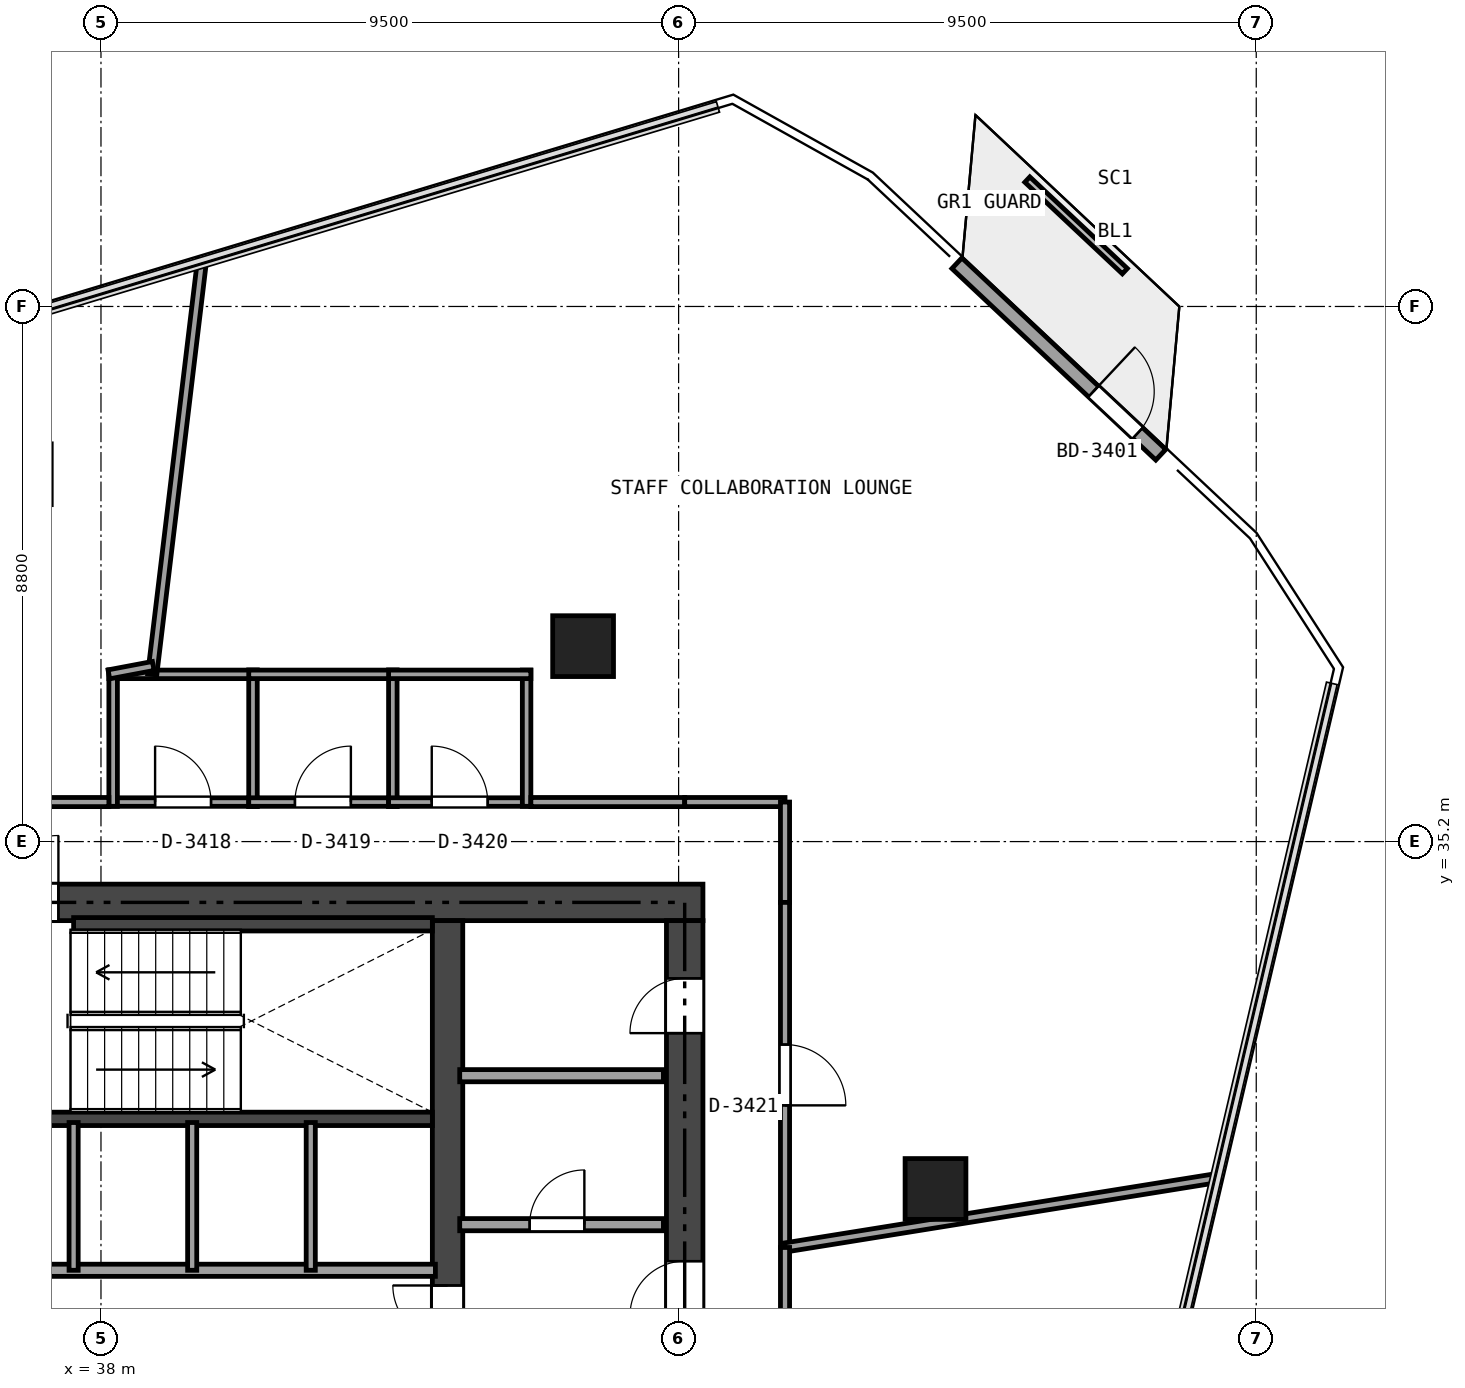
"""IFC4 building model, lengths in metres.
Left out: names, types, materials, properties, quantities, classifications, styles, units other than length and angle.
Written with IfcOpenShell. Run it as: python <this file> out.ifc"""

import sys

from ifc_helpers import new_model, si_unit, direction, frame, frame_2d, origin, origin_2d, place, context, subcontext, project, spatial, rectangle, extrude, element, fill, save


model = new_model("IFC4")
c1 = context("Model", 3, precision=1e-05, world=origin(), true_north=direction((0.0, 1.0)))
c2 = subcontext(c1, "Body", "Model", "MODEL_VIEW")
j1 = project(units=[si_unit("LENGTHUNIT", "METRE"), si_unit("PLANEANGLEUNIT", "RADIAN")], contexts=[c1])
p1 = place(None, origin())
s1 = spatial("IfcSite", under=j1, at=p1, CompositionType="ELEMENT")
p2 = place(p1, origin())
s2 = spatial("IfcBuilding", under=s1, at=p2, CompositionType="ELEMENT")
p3 = place(p2, frame((0.0, 0.0, 129.3)))
s3 = spatial("IfcBuildingStorey", under=s2, at=p3, CompositionType="ELEMENT", Elevation=129.3)
p4 = place(p3, frame((26.5, 34.2, 0.0), z_axis=(0.0, 0.0, 1.0), x_axis=(1.0, 0.0, 0.0)))
e1 = element("IfcWall", 1, at=p4, inside=s3, PredefinedType="SHEAR", context=c2, shape_type="SweptSolid", body=[
    extrude(rectangle(XDim=21.4, YDim=0.6, at=frame_2d((10.7, 0.0))), origin(), (0.0, 0.0, 1.0), 3.32),
])
p5 = place(p4, frame((9.7, 0.0, 0.0)))
e2 = element("IfcOpeningElement", 2, at=p5, cuts=e1, PredefinedType="OPENING", context=c2, shape_type="SweptSolid", body=[
    extrude(rectangle(XDim=1.1, YDim=2.15, at=frame_2d((0.55, 1.075))), frame((0.0, 0.31, 0.0), z_axis=(0.0, -1.0, 0.0), x_axis=(1.0, 0.0, 0.0)), (0.0, 0.0, 1.0), 0.62),
])
p6 = place(p4, frame((1.95, 0.0, 0.0)))
e3 = element("IfcOpeningElement", 3, at=p6, cuts=e1, PredefinedType="OPENING", context=c2, shape_type="SweptSolid", body=[
    extrude(rectangle(XDim=0.9, YDim=2.1, at=frame_2d((0.45, 1.05))), frame((0.0, 0.31, 0.0), z_axis=(0.0, -1.0, 0.0), x_axis=(1.0, 0.0, 0.0)), (0.0, 0.0, 1.0), 0.62),
])
p7 = place(p4, frame((6.25, 0.0, 0.0)))
e4 = element("IfcOpeningElement", 4, at=p7, cuts=e1, PredefinedType="OPENING", context=c2, shape_type="SweptSolid", body=[
    extrude(rectangle(XDim=0.9, YDim=2.1, at=frame_2d((0.45, 1.05))), frame((0.0, 0.31, 0.0), z_axis=(0.0, -1.0, 0.0), x_axis=(1.0, 0.0, 0.0)), (0.0, 0.0, 1.0), 0.62),
])
p8 = place(p3, frame((47.6, 18.9, 0.0), z_axis=(0.0, 0.0, 1.0), x_axis=(0.0, 1.0, 0.0)))
e5 = element("IfcWall", 5, at=p8, inside=s3, PredefinedType="SHEAR", context=c2, shape_type="SweptSolid", body=[
    extrude(rectangle(XDim=15.0, YDim=0.6, at=frame_2d((7.5, 0.0))), origin(), (0.0, 0.0, 1.0), 3.32),
])
p9 = place(p8, frame((6.6, 0.0, 0.0)))
e6 = element("IfcOpeningElement", 6, at=p9, cuts=e5, PredefinedType="OPENING", context=c2, shape_type="SweptSolid", body=[
    extrude(rectangle(XDim=1.1, YDim=2.15, at=frame_2d((0.55, 1.075))), frame((0.0, 0.31, 0.0), z_axis=(0.0, -1.0, 0.0), x_axis=(1.0, 0.0, 0.0)), (0.0, 0.0, 1.0), 0.62),
])
p10 = place(p8, frame((8.5, 0.0, 0.0)))
e7 = element("IfcOpeningElement", 7, at=p10, cuts=e5, PredefinedType="OPENING", context=c2, shape_type="SweptSolid", body=[
    extrude(rectangle(XDim=0.9, YDim=2.1, at=frame_2d((0.45, 1.05))), frame((0.0, 0.31, 0.0), z_axis=(0.0, -1.0, 0.0), x_axis=(1.0, 0.0, 0.0)), (0.0, 0.0, 1.0), 0.62),
])
p11 = place(p8, frame((13.15, 0.0, 0.0)))
e8 = element("IfcOpeningElement", 8, at=p11, cuts=e5, PredefinedType="OPENING", context=c2, shape_type="SweptSolid", body=[
    extrude(rectangle(XDim=0.9, YDim=2.1, at=frame_2d((0.45, 1.05))), frame((0.0, 0.31, 0.0), z_axis=(0.0, -1.0, 0.0), x_axis=(1.0, 0.0, 0.0)), (0.0, 0.0, 1.0), 0.62),
])
p12 = place(p3, frame((43.7, 18.9, 0.0), z_axis=(0.0, 0.0, 1.0), x_axis=(0.0, 1.0, 0.0)))
e9 = element("IfcWall", 9, at=p12, inside=s3, PredefinedType="SHEAR", context=c2, shape_type="SweptSolid", body=[
    extrude(rectangle(XDim=15.0, YDim=0.5, at=frame_2d((7.5, 0.0))), origin(), (0.0, 0.0, 1.0), 3.32),
])
p13 = place(p12, frame((8.1, 0.0, 0.0)))
e10 = element("IfcOpeningElement", 10, at=p13, cuts=e9, PredefinedType="OPENING", context=c2, shape_type="SweptSolid", body=[
    extrude(rectangle(XDim=0.9, YDim=2.1, at=frame_2d((0.45, 1.05))), frame((0.0, 0.26, 0.0), z_axis=(0.0, -1.0, 0.0), x_axis=(1.0, 0.0, 0.0)), (0.0, 0.0, 1.0), 0.52),
])
p14 = place(p3, frame((35.84, 30.64, 0.0), z_axis=(0.0, 0.0, 1.0), x_axis=(1.0, 0.0, 0.0)))
e11 = element("IfcWall", 11, at=p14, inside=s3, PredefinedType="SHEAR", context=c2, shape_type="SweptSolid", body=[
    extrude(rectangle(XDim=7.61, YDim=0.22, at=frame_2d((3.805, 0.0))), origin(), (0.0, 0.0, 1.0), 3.32),
])
p15 = place(p3, frame((37.55, 33.84, 0.0), z_axis=(0.0, 0.0, 1.0), x_axis=(1.0, 0.0, 0.0)))
e12 = element("IfcWall", 12, at=p15, inside=s3, PredefinedType="SHEAR", context=c2, shape_type="SweptSolid", body=[
    extrude(rectangle(XDim=5.9, YDim=0.22, at=frame_2d((2.95, 0.0))), origin(), (0.0, 0.0, 1.0), 3.32),
])
for number, where, z_axis, x_axis in (
    (13, (51.725, 29.487, 0.0), (0.0, 0.0, 1.0), (1.0, 0.0, 0.0)),
    (14, (45.929, 38.414, 0.0), (0.0, 0.0, 1.0), (1.0, 0.0, 0.0)),
):
    element("IfcColumn", number, at=place(p3, frame(where, z_axis=z_axis, x_axis=x_axis)), inside=s3, PredefinedType="COLUMN", context=c2, shape_type="SweptSolid", body=[
        extrude(rectangle(XDim=1.0, YDim=1.0, at=origin_2d()), origin(), (0.0, 0.0, 1.0), 3.32),
    ])
p16 = place(p3, frame((52.077, 44.711, 0.0), z_axis=(0.0, 0.0, 1.0), x_axis=(0.728944378219, -0.68457292779, 0.0)))
e15 = element("IfcWall", 15, at=p16, inside=s3, PredefinedType="SOLIDWALL", context=c2, shape_type="SweptSolid", body=[
    extrude(rectangle(XDim=4.6, YDim=0.24, at=frame_2d((2.3, 0.0))), origin(), (0.0, 0.0, 1.0), 3.32),
])
p17 = place(p16, frame((3.08, 0.0, 0.0)))
e16 = element("IfcOpeningElement", 16, at=p17, cuts=e15, PredefinedType="OPENING", context=c2, shape_type="SweptSolid", body=[
    extrude(rectangle(XDim=1.0, YDim=2.15, at=frame_2d((0.5, 1.075))), frame((0.0, 0.13, 0.0), z_axis=(0.0, -1.0, 0.0), x_axis=(1.0, 0.0, 0.0)), (0.0, 0.0, 1.0), 0.26),
])
p18 = place(p3, frame((43.9, 28.9, 0.0), z_axis=(0.0, 0.0, 1.0), x_axis=(1.0, 0.0, 0.0)))
e17 = element("IfcWall", 17, at=p18, inside=s3, PredefinedType="SOLIDWALL", context=c2, shape_type="SweptSolid", body=[
    extrude(rectangle(XDim=3.35, YDim=0.2, at=frame_2d((1.675, 0.0))), origin(), (0.0, 0.0, 1.0), 3.32),
])
p19 = place(p18, frame((1.15, 0.0, 0.0)))
e18 = element("IfcOpeningElement", 18, at=p19, cuts=e17, PredefinedType="OPENING", context=c2, shape_type="SweptSolid", body=[
    extrude(rectangle(XDim=0.9, YDim=2.1, at=frame_2d((0.45, 1.05))), frame((0.0, 0.11, 0.0), z_axis=(0.0, -1.0, 0.0), x_axis=(1.0, 0.0, 0.0)), (0.0, 0.0, 1.0), 0.22),
])
p20 = place(p3, frame((43.9, 31.35, 0.0), z_axis=(0.0, 0.0, 1.0), x_axis=(1.0, 0.0, 0.0)))
e19 = element("IfcWall", 19, at=p20, inside=s3, PredefinedType="SOLIDWALL", context=c2, shape_type="SweptSolid", body=[
    extrude(rectangle(XDim=3.35, YDim=0.2, at=frame_2d((1.675, 0.0))), origin(), (0.0, 0.0, 1.0), 2.949),
])
p21 = place(p3, frame((35.62, 28.15, 0.0), z_axis=(0.0, 0.0, 1.0), x_axis=(1.0, 0.0, 0.0)))
e20 = element("IfcWall", 20, at=p21, inside=s3, PredefinedType="SOLIDWALL", context=c2, shape_type="SweptSolid", body=[
    extrude(rectangle(XDim=7.88, YDim=0.2, at=frame_2d((3.94, 0.0))), origin(), (0.0, 0.0, 1.0), 3.32),
])
for number, where, z_axis, x_axis in (
    (21, (37.55, 28.15, 0.0), (0.0, 0.0, 1.0), (0.0, 1.0, 0.0)),
    (22, (39.5, 28.15, 0.0), (0.0, 0.0, 1.0), (0.0, 1.0, 0.0)),
    (23, (41.45, 28.15, 0.0), (0.0, 0.0, 1.0), (0.0, 1.0, 0.0)),
):
    element("IfcWall", number, at=place(p3, frame(where, z_axis=z_axis, x_axis=x_axis)), inside=s3, PredefinedType="PARTITIONING", context=c2, shape_type="SweptSolid", body=[
        extrude(rectangle(XDim=2.43, YDim=0.15, at=frame_2d((1.215, 0.0))), origin(), (0.0, 0.0, 1.0), 3.32),
    ])
p22 = place(p3, frame((38.13, 35.85, 0.0), z_axis=(0.0, 0.0, 1.0), x_axis=(1.0, 0.0, 0.0)))
e24 = element("IfcWall", 24, at=p22, inside=s3, PredefinedType="PARTITIONING", context=c2, shape_type="SweptSolid", body=[
    extrude(rectangle(XDim=2.44, YDim=0.14, at=frame_2d((1.22, 0.0))), origin(), (0.0, 0.0, 1.0), 3.32),
])
p23 = place(p22, frame((0.76, 0.0, 0.0)))
e25 = element("IfcOpeningElement", 25, at=p23, cuts=e24, PredefinedType="OPENING", context=c2, shape_type="SweptSolid", body=[
    extrude(rectangle(XDim=0.92, YDim=2.1, at=frame_2d((0.46, 1.05))), frame((0.0, 0.08, 0.0), z_axis=(0.0, -1.0, 0.0), x_axis=(1.0, 0.0, 0.0)), (0.0, 0.0, 1.0), 0.16),
])
p24 = place(p3, frame((40.5, 35.78, 0.0), z_axis=(0.0, 0.0, 1.0), x_axis=(0.0, 1.0, 0.0)))
e26 = element("IfcWall", 26, at=p24, inside=s3, PredefinedType="PARTITIONING", context=c2, shape_type="SweptSolid", body=[
    extrude(rectangle(XDim=2.24, YDim=0.14, at=frame_2d((1.12, 0.0))), origin(), (0.0, 0.0, 1.0), 2.949),
])
p25 = place(p3, frame((40.57, 37.95, 0.0), z_axis=(0.0, 0.0, 1.0), x_axis=(-1.0, 0.0, 0.0)))
e27 = element("IfcWall", 27, at=p25, inside=s3, PredefinedType="PARTITIONING", context=c2, shape_type="SweptSolid", body=[
    extrude(rectangle(XDim=2.44, YDim=0.14, at=frame_2d((1.22, 0.0))), origin(), (0.0, 0.0, 1.0), 2.949),
])
p26 = place(p3, frame((38.2, 38.02, 0.0), z_axis=(0.0, 0.0, 1.0), x_axis=(0.0, -1.0, 0.0)))
e28 = element("IfcWall", 28, at=p26, inside=s3, PredefinedType="PARTITIONING", context=c2, shape_type="SweptSolid", body=[
    extrude(rectangle(XDim=2.24, YDim=0.14, at=frame_2d((1.12, 0.0))), origin(), (0.0, 0.0, 1.0), 2.949),
])
p27 = place(p3, frame((40.43, 35.85, 0.0), z_axis=(0.0, 0.0, 1.0), x_axis=(1.0, 0.0, 0.0)))
e29 = element("IfcWall", 29, at=p27, inside=s3, PredefinedType="PARTITIONING", context=c2, shape_type="SweptSolid", body=[
    extrude(rectangle(XDim=2.44, YDim=0.14, at=frame_2d((1.22, 0.0))), origin(), (0.0, 0.0, 1.0), 2.949),
])
p28 = place(p27, frame((0.76, 0.0, 0.0)))
e30 = element("IfcOpeningElement", 30, at=p28, cuts=e29, PredefinedType="OPENING", context=c2, shape_type="SweptSolid", body=[
    extrude(rectangle(XDim=0.92, YDim=2.1, at=frame_2d((0.46, 1.05))), frame((0.0, 0.08, 0.0), z_axis=(0.0, -1.0, 0.0), x_axis=(1.0, 0.0, 0.0)), (0.0, 0.0, 1.0), 0.16),
])
p29 = place(p3, frame((42.8, 35.78, 0.0), z_axis=(0.0, 0.0, 1.0), x_axis=(0.0, 1.0, 0.0)))
e31 = element("IfcWall", 31, at=p29, inside=s3, PredefinedType="PARTITIONING", context=c2, shape_type="SweptSolid", body=[
    extrude(rectangle(XDim=2.24, YDim=0.14, at=frame_2d((1.12, 0.0))), origin(), (0.0, 0.0, 1.0), 2.949),
])
p30 = place(p3, frame((42.87, 37.95, 0.0), z_axis=(0.0, 0.0, 1.0), x_axis=(-1.0, 0.0, 0.0)))
e32 = element("IfcWall", 32, at=p30, inside=s3, PredefinedType="PARTITIONING", context=c2, shape_type="SweptSolid", body=[
    extrude(rectangle(XDim=2.44, YDim=0.14, at=frame_2d((1.22, 0.0))), origin(), (0.0, 0.0, 1.0), 2.949),
])
p31 = place(p3, frame((42.73, 35.85, 0.0), z_axis=(0.0, 0.0, 1.0), x_axis=(1.0, 0.0, 0.0)))
e33 = element("IfcWall", 33, at=p31, inside=s3, PredefinedType="PARTITIONING", context=c2, shape_type="SweptSolid", body=[
    extrude(rectangle(XDim=2.34, YDim=0.14, at=frame_2d((1.17, 0.0))), origin(), (0.0, 0.0, 1.0), 2.687),
])
p32 = place(p31, frame((0.71, 0.0, 0.0)))
e34 = element("IfcOpeningElement", 34, at=p32, cuts=e33, PredefinedType="OPENING", context=c2, shape_type="SweptSolid", body=[
    extrude(rectangle(XDim=0.92, YDim=2.1, at=frame_2d((0.46, 1.05))), frame((0.0, 0.08, 0.0), z_axis=(0.0, -1.0, 0.0), x_axis=(1.0, 0.0, 0.0)), (0.0, 0.0, 1.0), 0.16),
])
p33 = place(p3, frame((45.0, 35.78, 0.0), z_axis=(0.0, 0.0, 1.0), x_axis=(0.0, 1.0, 0.0)))
e35 = element("IfcWall", 35, at=p33, inside=s3, PredefinedType="PARTITIONING", context=c2, shape_type="SweptSolid", body=[
    extrude(rectangle(XDim=2.24, YDim=0.14, at=frame_2d((1.12, 0.0))), origin(), (0.0, 0.0, 1.0), 2.687),
])
p34 = place(p3, frame((45.07, 37.95, 0.0), z_axis=(0.0, 0.0, 1.0), x_axis=(-1.0, 0.0, 0.0)))
e36 = element("IfcWall", 36, at=p34, inside=s3, PredefinedType="PARTITIONING", context=c2, shape_type="SweptSolid", body=[
    extrude(rectangle(XDim=2.34, YDim=0.14, at=frame_2d((1.17, 0.0))), origin(), (0.0, 0.0, 1.0), 3.32),
])
p35 = place(p3, frame((39.663, 44.77, 0.0), z_axis=(0.0, 0.0, 1.0), x_axis=(-0.119383467709, -0.992848219839, 0.0)))
e37 = element("IfcWall", 37, at=p35, inside=s3, PredefinedType="PARTITIONING", context=c2, shape_type="SweptSolid", body=[
    extrude(rectangle(XDim=6.869, YDim=0.15, at=frame_2d((3.435, 0.0))), origin(), (0.0, 0.0, 1.0), 2.805),
])
p36 = place(p3, frame((45.07, 35.85, 0.0), z_axis=(0.0, 0.0, 1.0), x_axis=(1.0, 0.0, 0.0)))
e38 = element("IfcWall", 38, at=p36, inside=s3, PredefinedType="PARTITIONING", context=c2, shape_type="SweptSolid", body=[
    extrude(rectangle(XDim=2.53, YDim=0.15, at=frame_2d((1.265, 0.0))), origin(), (0.0, 0.0, 1.0), 2.805),
])
p37 = place(p3, frame((47.6, 35.85, 0.0), z_axis=(0.0, 0.0, 1.0), x_axis=(1.0, 0.0, 0.0)))
e39 = element("IfcWall", 39, at=p37, inside=s3, PredefinedType="PARTITIONING", context=c2, shape_type="SweptSolid", body=[
    extrude(rectangle(XDim=1.65, YDim=0.15, at=frame_2d((0.825, 0.0))), origin(), (0.0, 0.0, 1.0), 2.805),
])
p38 = place(p3, frame((49.25, 35.85, 0.0), z_axis=(0.0, 0.0, 1.0), x_axis=(0.0, -1.0, 0.0)))
e40 = element("IfcWall", 40, at=p38, inside=s3, PredefinedType="PARTITIONING", context=c2, shape_type="SweptSolid", body=[
    extrude(rectangle(XDim=1.65, YDim=0.15, at=frame_2d((0.825, 0.0))), origin(), (0.0, 0.0, 1.0), 3.32),
])
p39 = place(p3, frame((49.25, 34.2, 0.0), z_axis=(0.0, 0.0, 1.0), x_axis=(0.0, -1.0, 0.0)))
e41 = element("IfcWall", 41, at=p39, inside=s3, PredefinedType="PARTITIONING", context=c2, shape_type="SweptSolid", body=[
    extrude(rectangle(XDim=5.675, YDim=0.15, at=frame_2d((2.837, 0.0))), origin(), (0.0, 0.0, 1.0), 2.687),
])
p40 = place(p39, frame((2.338, 0.0, 0.0)))
e42 = element("IfcOpeningElement", 42, at=p40, cuts=e41, PredefinedType="OPENING", context=c2, shape_type="SweptSolid", body=[
    extrude(rectangle(XDim=1.0, YDim=2.15, at=frame_2d((0.5, 1.075))), frame((0.0, 0.085, 0.0), z_axis=(0.0, -1.0, 0.0), x_axis=(1.0, 0.0, 0.0)), (0.0, 0.0, 1.0), 0.17),
])
p41 = place(p3, frame((49.25, 28.525, 0.0), z_axis=(0.0, 0.0, 1.0), x_axis=(0.987338784073, 0.158625740235, 0.0)))
e43 = element("IfcWall", 43, at=p41, inside=s3, PredefinedType="PARTITIONING", context=c2, shape_type="SweptSolid", body=[
    extrude(rectangle(XDim=7.225, YDim=0.15, at=frame_2d((3.612, 0.0))), origin(), (0.0, 0.0, 1.0), 2.805),
])
p42 = place(p3, frame((26.8, 35.85, 0.0), z_axis=(0.0, 0.0, 1.0), x_axis=(1.0, 0.0, 0.0)))
e44 = element("IfcWall", 44, at=p42, inside=s3, PredefinedType="PARTITIONING", context=c2, shape_type="SweptSolid", body=[
    extrude(rectangle(XDim=11.33, YDim=0.15, at=frame_2d((5.665, 0.0))), origin(), (0.0, 0.0, 1.0), 2.687),
])
p43 = place(p42, frame((5.165, 0.0, 0.0)))
e45 = element("IfcOpeningElement", 45, at=p43, cuts=e44, PredefinedType="OPENING", context=c2, shape_type="SweptSolid", body=[
    extrude(rectangle(XDim=1.0, YDim=2.15, at=frame_2d((0.5, 1.075))), frame((0.0, 0.085, 0.0), z_axis=(0.0, -1.0, 0.0), x_axis=(1.0, 0.0, 0.0)), (0.0, 0.0, 1.0), 0.17),
])
p44 = place(p3, frame((38.13, 37.95, 0.0), z_axis=(0.0, 0.0, 1.0), x_axis=(0.982622104364, 0.185617348367, 0.0)))
e46 = element("IfcWall", 46, at=p44, inside=s3, PredefinedType="PARTITIONING", context=c2, shape_type="SweptSolid", body=[
    extrude(rectangle(XDim=0.743, YDim=0.15, at=frame_2d((0.372, 0.0))), origin(), (0.0, 0.0, 1.0), 3.32),
])
p45 = place(p3, frame((49.25, 28.525, 0.0), z_axis=(0.0, 0.0, 1.0), x_axis=(0.0, -1.0, 0.0)))
e47 = element("IfcWall", 47, at=p45, inside=s3, PredefinedType="PARTITIONING", context=c2, shape_type="SweptSolid", body=[
    extrude(rectangle(XDim=9.925, YDim=0.15, at=frame_2d((4.962, 0.0))), origin(), (0.0, 0.0, 1.0), 2.687),
])
p46 = place(p45, frame((4.462, 0.0, 0.0)))
e48 = element("IfcOpeningElement", 48, at=p46, cuts=e47, PredefinedType="OPENING", context=c2, shape_type="SweptSolid", body=[
    extrude(rectangle(XDim=1.0, YDim=2.15, at=frame_2d((0.5, 1.075))), frame((0.0, 0.085, 0.0), z_axis=(0.0, -1.0, 0.0), x_axis=(1.0, 0.0, 0.0)), (0.0, 0.0, 1.0), 0.17),
])
p47 = place(p17, origin())
e49 = element("IfcDoor", 49, at=p47, inside=s3, OperationType="SINGLE_SWING_LEFT", PredefinedType="DOOR", context=c2, shape_type="SweptSolid", body=[
    extrude(rectangle(XDim=1.0, YDim=2.15, at=frame_2d((0.5, 1.075))), frame((0.0, 0.025, 0.0), z_axis=(0.0, -1.0, 0.0), x_axis=(1.0, 0.0, 0.0)), (0.0, 0.0, 1.0), 0.05),
])
fill(e16, e49)
p48 = place(p5, origin())
e50 = element("IfcDoor", 50, at=p48, inside=s3, OperationType="SINGLE_SWING_RIGHT", PredefinedType="DOOR", context=c2, shape_type="SweptSolid", body=[
    extrude(rectangle(XDim=1.1, YDim=2.15, at=frame_2d((0.55, 1.075))), frame((0.0, 0.025, 0.0), z_axis=(0.0, -1.0, 0.0), x_axis=(1.0, 0.0, 0.0)), (0.0, 0.0, 1.0), 0.05),
])
fill(e2, e50)
p49 = place(p13, origin())
e51 = element("IfcDoor", 51, at=p49, inside=s3, OperationType="SINGLE_SWING_RIGHT", PredefinedType="DOOR", context=c2, shape_type="SweptSolid", body=[
    extrude(rectangle(XDim=0.9, YDim=2.1, at=frame_2d((0.45, 1.05))), frame((0.0, 0.025, 0.0), z_axis=(0.0, -1.0, 0.0), x_axis=(1.0, 0.0, 0.0)), (0.0, 0.0, 1.0), 0.05),
])
fill(e10, e51)
p50 = place(p10, origin())
e52 = element("IfcDoor", 52, at=p50, inside=s3, OperationType="SINGLE_SWING_LEFT", PredefinedType="DOOR", context=c2, shape_type="SweptSolid", body=[
    extrude(rectangle(XDim=0.9, YDim=2.1, at=frame_2d((0.45, 1.05))), frame((0.0, 0.025, 0.0), z_axis=(0.0, -1.0, 0.0), x_axis=(1.0, 0.0, 0.0)), (0.0, 0.0, 1.0), 0.05),
])
fill(e7, e52)
p51 = place(p19, origin())
e53 = element("IfcDoor", 53, at=p51, inside=s3, OperationType="SINGLE_SWING_RIGHT", PredefinedType="DOOR", context=c2, shape_type="SweptSolid", body=[
    extrude(rectangle(XDim=0.9, YDim=2.1, at=frame_2d((0.45, 1.05))), frame((0.0, 0.025, 0.0), z_axis=(0.0, -1.0, 0.0), x_axis=(1.0, 0.0, 0.0)), (0.0, 0.0, 1.0), 0.05),
])
fill(e18, e53)
p52 = place(p11, origin())
e54 = element("IfcDoor", 54, at=p52, inside=s3, OperationType="SINGLE_SWING_LEFT", PredefinedType="DOOR", context=c2, shape_type="SweptSolid", body=[
    extrude(rectangle(XDim=0.9, YDim=2.1, at=frame_2d((0.45, 1.05))), frame((0.0, 0.025, 0.0), z_axis=(0.0, -1.0, 0.0), x_axis=(1.0, 0.0, 0.0)), (0.0, 0.0, 1.0), 0.05),
])
fill(e8, e54)
p53 = place(p23, origin())
e55 = element("IfcDoor", 55, at=p53, inside=s3, OperationType="SINGLE_SWING_LEFT", PredefinedType="DOOR", context=c2, shape_type="SweptSolid", body=[
    extrude(rectangle(XDim=0.92, YDim=2.1, at=frame_2d((0.46, 1.05))), frame((0.0, 0.025, 0.0), z_axis=(0.0, -1.0, 0.0), x_axis=(1.0, 0.0, 0.0)), (0.0, 0.0, 1.0), 0.05),
])
fill(e25, e55)
p54 = place(p28, origin())
e56 = element("IfcDoor", 56, at=p54, inside=s3, OperationType="SINGLE_SWING_RIGHT", PredefinedType="DOOR", context=c2, shape_type="SweptSolid", body=[
    extrude(rectangle(XDim=0.92, YDim=2.1, at=frame_2d((0.46, 1.05))), frame((0.0, 0.025, 0.0), z_axis=(0.0, -1.0, 0.0), x_axis=(1.0, 0.0, 0.0)), (0.0, 0.0, 1.0), 0.05),
])
fill(e30, e56)
p55 = place(p32, origin())
e57 = element("IfcDoor", 57, at=p55, inside=s3, OperationType="SINGLE_SWING_LEFT", PredefinedType="DOOR", context=c2, shape_type="SweptSolid", body=[
    extrude(rectangle(XDim=0.92, YDim=2.1, at=frame_2d((0.46, 1.05))), frame((0.0, 0.025, 0.0), z_axis=(0.0, -1.0, 0.0), x_axis=(1.0, 0.0, 0.0)), (0.0, 0.0, 1.0), 0.05),
])
fill(e34, e57)
p56 = place(p40, origin())
e58 = element("IfcDoor", 58, at=p56, inside=s3, OperationType="SINGLE_SWING_RIGHT", PredefinedType="DOOR", context=c2, shape_type="SweptSolid", body=[
    extrude(rectangle(XDim=1.0, YDim=2.15, at=frame_2d((0.5, 1.075))), frame((0.0, 0.025, 0.0), z_axis=(0.0, -1.0, 0.0), x_axis=(1.0, 0.0, 0.0)), (0.0, 0.0, 1.0), 0.05),
])
fill(e42, e58)
save(model, sys.argv[1])
